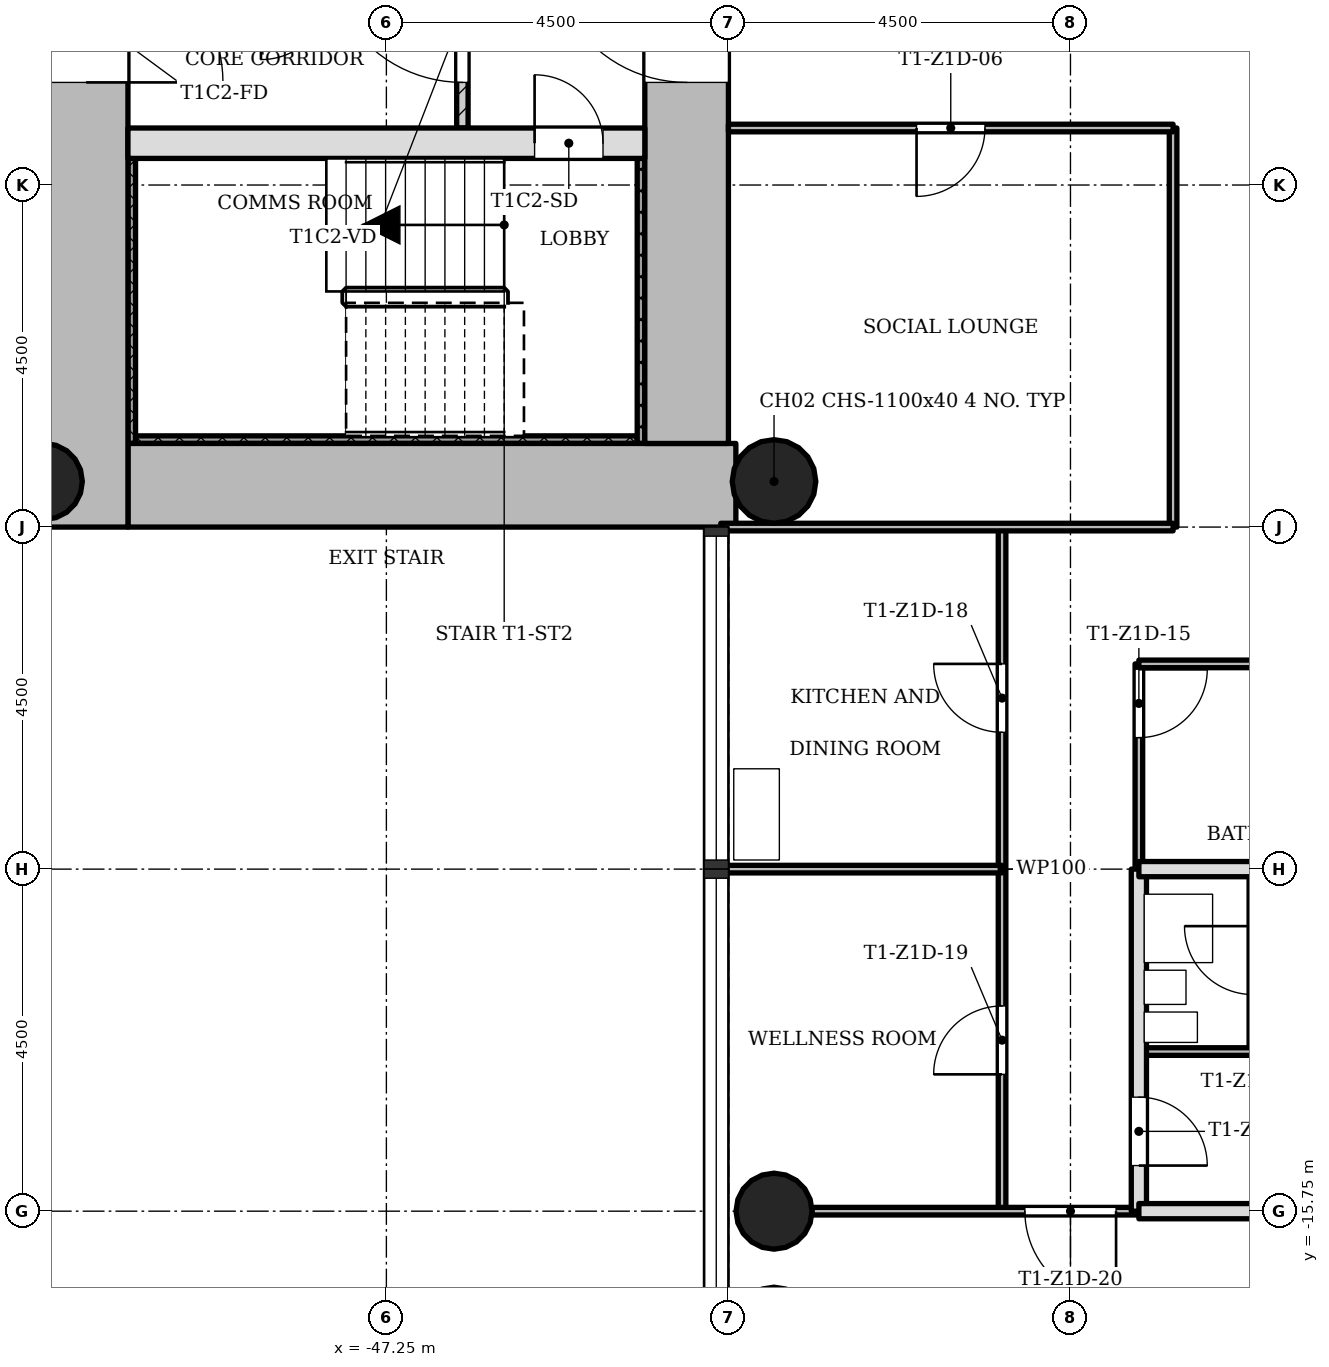
"""IFC4 building model, lengths in metres.
Left out: names, types, materials, properties, quantities, classifications, styles, units other than length and angle.
Written with IfcOpenShell. Run it as: python <this file> out.ifc"""

import sys

from ifc_helpers import new_model, si_unit, direction, frame, frame_2d, origin, origin_2d, place, context, subcontext, project, spatial, rectangle, hollow_circle, extrude, element, fill, save


model = new_model("IFC4")
c1 = context("Model", 3, precision=1e-05, world=origin(), true_north=direction((0.0, 1.0)))
c2 = subcontext(c1, "Body", "Model", "MODEL_VIEW")
j1 = project(units=[si_unit("LENGTHUNIT", "METRE"), si_unit("PLANEANGLEUNIT", "RADIAN")], contexts=[c1])
p1 = place(None, origin())
s1 = spatial("IfcSite", under=j1, at=p1, CompositionType="ELEMENT")
p2 = place(p1, origin())
s2 = spatial("IfcBuilding", under=s1, at=p2, CompositionType="ELEMENT")
p3 = place(p2, frame((0.0, 0.0, 61.9)))
s3 = spatial("IfcBuildingStorey", under=s2, at=p3, CompositionType="ELEMENT", Elevation=61.9)
p4 = place(p3, frame((-50.65, -6.2, 0.0), z_axis=(0.0, 0.0, 1.0), x_axis=(1.0, 0.0, 0.0)))
e1 = element("IfcWall", 1, at=p4, inside=s3, PredefinedType="SHEAR", context=c2, shape_type="SweptSolid", body=[
    extrude(rectangle(XDim=7.998, YDim=1.1, at=frame_2d((3.999, 0.0))), origin(), (0.0, 0.0, 1.0), 3.4),
])
p5 = place(p3, frame((-43.3, -5.65, 0.0), z_axis=(0.0, 0.0, 1.0), x_axis=(0.0, 1.0, 0.0)))
e2 = element("IfcWall", 2, at=p5, inside=s3, PredefinedType="SHEAR", context=c2, shape_type="SweptSolid", body=[
    extrude(rectangle(XDim=12.4, YDim=1.1, at=frame_2d((6.2, 0.0))), origin(), (0.0, 0.0, 1.0), 3.4),
])
p6 = place(p5, frame((4.75, 0.0, 0.0)))
e3 = element("IfcOpeningElement", 3, at=p6, cuts=e2, PredefinedType="OPENING", context=c2, shape_type="SweptSolid", body=[
    extrude(rectangle(XDim=1.8, YDim=2.1, at=frame_2d((0.9, 1.05))), frame((0.0, 0.56, 0.0), z_axis=(0.0, -1.0, 0.0), x_axis=(1.0, 0.0, 0.0)), (0.0, 0.0, 1.0), 1.12),
])
p7 = place(p3, frame((-51.2, 5.65, 0.0), z_axis=(0.0, 0.0, 1.0), x_axis=(0.0, -1.0, 0.0)))
e4 = element("IfcWall", 4, at=p7, inside=s3, PredefinedType="SHEAR", context=c2, shape_type="SweptSolid", body=[
    extrude(rectangle(XDim=12.4, YDim=1.1, at=frame_2d((6.2, 0.0))), origin(), (0.0, 0.0, 1.0), 3.4),
])
p8 = place(p7, frame((4.75, 0.0, 0.0)))
e5 = element("IfcOpeningElement", 5, at=p8, cuts=e4, PredefinedType="OPENING", context=c2, shape_type="SweptSolid", body=[
    extrude(rectangle(XDim=1.8, YDim=2.1, at=frame_2d((0.9, 1.05))), frame((0.0, 0.56, 0.0), z_axis=(0.0, -1.0, 0.0), x_axis=(1.0, 0.0, 0.0)), (0.0, 0.0, 1.0), 1.12),
])
p9 = place(p3, frame((-50.65, -1.7, 0.0), z_axis=(0.0, 0.0, 1.0), x_axis=(1.0, 0.0, 0.0)))
e6 = element("IfcWall", 6, at=p9, inside=s3, PredefinedType="SHEAR", context=c2, shape_type="SweptSolid", body=[
    extrude(rectangle(XDim=6.8, YDim=0.4, at=frame_2d((3.4, 0.0))), origin(), (0.0, 0.0, 1.0), 3.4),
])
p10 = place(p9, frame((5.35, 0.0, 0.0)))
e7 = element("IfcOpeningElement", 7, at=p10, cuts=e6, PredefinedType="OPENING", context=c2, shape_type="SweptSolid", body=[
    extrude(rectangle(XDim=0.9, YDim=2.1, at=frame_2d((0.45, 1.05))), frame((0.0, 0.21, 0.0), z_axis=(0.0, -1.0, 0.0), x_axis=(1.0, 0.0, 0.0)), (0.0, 0.0, 1.0), 0.42),
])
for number, where, z_axis, x_axis in (
    (8, (-51.75, -6.15, 0.0), (0.0, 0.0, 1.0), (1.0, 0.0, 0.0)),
    (9, (-42.15, -15.75, 0.0), (0.0, 0.0, 1.0), (1.0, 0.0, 0.0)),
):
    element("IfcColumn", number, at=place(p3, frame(where, z_axis=z_axis, x_axis=x_axis)), inside=s3, PredefinedType="COLUMN", context=c2, shape_type="SweptSolid", body=[
        extrude(hollow_circle(Radius=0.5, WallThickness=0.036, at=origin_2d()), origin(), (0.0, 0.0, 1.0), 3.4),
    ])
p11 = place(p3, frame((-42.15, -6.15, 0.0), z_axis=(0.0, 0.0, 1.0), x_axis=(1.0, 0.0, 0.0)))
e10 = element("IfcColumn", 10, at=p11, inside=s3, PredefinedType="COLUMN", context=c2, shape_type="SweptSolid", body=[
    extrude(hollow_circle(Radius=0.55, WallThickness=0.04, at=origin_2d()), origin(), (0.0, 0.0, 1.0), 3.4),
])
p12 = place(p3, frame((-46.25, 1.5, 0.0), z_axis=(0.0, 0.0, 1.0), x_axis=(0.0, -1.0, 0.0)))
e11 = element("IfcWall", 11, at=p12, inside=s3, PredefinedType="PARTITIONING", context=c2, shape_type="SweptSolid", body=[
    extrude(rectangle(XDim=3.0, YDim=0.15, at=frame_2d((1.5, 0.0))), origin(), (0.0, 0.0, 1.0), 3.0),
])
p13 = place(p12, frame((0.6, 0.0, 0.0)))
e12 = element("IfcOpeningElement", 12, at=p13, cuts=e11, PredefinedType="OPENING", context=c2, shape_type="SweptSolid", body=[
    extrude(rectangle(XDim=1.8, YDim=2.1, at=frame_2d((0.9, 1.05))), frame((0.0, 0.085, 0.0), z_axis=(0.0, -1.0, 0.0), x_axis=(1.0, 0.0, 0.0)), (0.0, 0.0, 1.0), 0.17),
])
p14 = place(p3, frame((-39.15, -15.75, 0.0), z_axis=(0.0, 0.0, 1.0), x_axis=(0.0, 1.0, 0.0)))
e13 = element("IfcWall", 13, at=p14, inside=s3, PredefinedType="PARTITIONING", context=c2, shape_type="SweptSolid", body=[
    extrude(rectangle(XDim=9.0, YDim=0.1, at=frame_2d((4.5, 0.0))), origin(), (0.0, 0.0, 1.0), 3.0),
])
p15 = place(p14, frame((6.3, 0.0, 0.0)))
e14 = element("IfcOpeningElement", 14, at=p15, cuts=e13, PredefinedType="OPENING", context=c2, shape_type="SweptSolid", body=[
    extrude(rectangle(XDim=0.9, YDim=2.1, at=frame_2d((0.45, 1.05))), frame((0.0, 0.06, 0.0), z_axis=(0.0, -1.0, 0.0), x_axis=(1.0, 0.0, 0.0)), (0.0, 0.0, 1.0), 0.12),
])
p16 = place(p14, frame((1.8, 0.0, 0.0)))
e15 = element("IfcOpeningElement", 15, at=p16, cuts=e13, PredefinedType="OPENING", context=c2, shape_type="SweptSolid", body=[
    extrude(rectangle(XDim=0.9, YDim=2.1, at=frame_2d((0.45, 1.05))), frame((0.0, 0.06, 0.0), z_axis=(0.0, -1.0, 0.0), x_axis=(1.0, 0.0, 0.0)), (0.0, 0.0, 1.0), 0.12),
])
p17 = place(p3, frame((-37.35, -11.25, 0.0), z_axis=(0.0, 0.0, 1.0), x_axis=(0.0, 1.0, 0.0)))
e16 = element("IfcWall", 16, at=p17, inside=s3, PredefinedType="PARTITIONING", context=c2, shape_type="SweptSolid", body=[
    extrude(rectangle(XDim=2.7, YDim=0.1, at=frame_2d((1.35, 0.0))), origin(), (0.0, 0.0, 1.0), 3.0),
])
p18 = place(p17, frame((1.73, 0.0, 0.0)))
e17 = element("IfcOpeningElement", 17, at=p18, cuts=e16, PredefinedType="OPENING", context=c2, shape_type="SweptSolid", body=[
    extrude(rectangle(XDim=0.9, YDim=2.1, at=frame_2d((0.45, 1.05))), frame((0.0, 0.06, 0.0), z_axis=(0.0, -1.0, 0.0), x_axis=(1.0, 0.0, 0.0)), (0.0, 0.0, 1.0), 0.12),
])
p19 = place(p3, frame((-37.35, -15.75, 0.0), z_axis=(0.0, 0.0, 1.0), x_axis=(0.0, 1.0, 0.0)))
e18 = element("IfcWall", 18, at=p19, inside=s3, PredefinedType="SOLIDWALL", context=c2, shape_type="SweptSolid", body=[
    extrude(rectangle(XDim=4.5, YDim=0.2, at=frame_2d((2.25, 0.0))), origin(), (0.0, 0.0, 1.0), 3.0),
])
p20 = place(p19, frame((0.6, 0.0, 0.0)))
e19 = element("IfcOpeningElement", 19, at=p20, cuts=e18, PredefinedType="OPENING", context=c2, shape_type="SweptSolid", body=[
    extrude(rectangle(XDim=0.9, YDim=2.1, at=frame_2d((0.45, 1.05))), frame((0.0, 0.11, 0.0), z_axis=(0.0, -1.0, 0.0), x_axis=(1.0, 0.0, 0.0)), (0.0, 0.0, 1.0), 0.22),
])
p21 = place(p3, frame((-36.9, -6.75, 0.0), z_axis=(0.0, 0.0, 1.0), x_axis=(0.0, 1.0, 0.0)))
e20 = element("IfcWall", 20, at=p21, inside=s3, PredefinedType="PARTITIONING", context=c2, shape_type="SweptSolid", body=[
    extrude(rectangle(XDim=5.25, YDim=0.1, at=frame_2d((2.625, 0.0))), origin(), (0.0, 0.0, 1.0), 3.0),
])
p22 = place(p3, frame((-35.85, -13.65, 0.0), z_axis=(0.0, 0.0, 1.0), x_axis=(0.0, 1.0, 0.0)))
e21 = element("IfcWall", 21, at=p22, inside=s3, PredefinedType="PARTITIONING", context=c2, shape_type="SweptSolid", body=[
    extrude(rectangle(XDim=2.4, YDim=0.1, at=frame_2d((1.2, 0.0))), origin(), (0.0, 0.0, 1.0), 3.0),
])
p23 = place(p22, frame((0.75, 0.0, 0.0)))
e22 = element("IfcOpeningElement", 22, at=p23, cuts=e21, PredefinedType="OPENING", context=c2, shape_type="SweptSolid", body=[
    extrude(rectangle(XDim=0.9, YDim=2.1, at=frame_2d((0.45, 1.05))), frame((0.0, 0.06, 0.0), z_axis=(0.0, -1.0, 0.0), x_axis=(1.0, 0.0, 0.0)), (0.0, 0.0, 1.0), 0.12),
])
p24 = place(p3, frame((-41.65, -15.75, 0.0), z_axis=(0.0, 0.0, 1.0), x_axis=(1.0, 0.0, 0.0)))
e23 = element("IfcWall", 23, at=p24, inside=s3, PredefinedType="PARTITIONING", context=c2, shape_type="SweptSolid", body=[
    extrude(rectangle(XDim=4.3, YDim=0.1, at=frame_2d((2.15, 0.0))), origin(), (0.0, 0.0, 1.0), 3.0),
])
p25 = place(p24, frame((2.8, 0.0, 0.0)))
e24 = element("IfcOpeningElement", 24, at=p25, cuts=e23, PredefinedType="OPENING", context=c2, shape_type="SweptSolid", body=[
    extrude(rectangle(XDim=1.2, YDim=2.1, at=frame_2d((0.6, 1.05))), frame((0.0, 0.06, 0.0), z_axis=(0.0, -1.0, 0.0), x_axis=(1.0, 0.0, 0.0)), (0.0, 0.0, 1.0), 0.12),
])
p26 = place(p3, frame((-37.35, -15.75, 0.0), z_axis=(0.0, 0.0, 1.0), x_axis=(1.0, 0.0, 0.0)))
e25 = element("IfcWall", 25, at=p26, inside=s3, PredefinedType="SOLIDWALL", context=c2, shape_type="SweptSolid", body=[
    extrude(rectangle(XDim=7.0, YDim=0.2, at=frame_2d((3.5, 0.0))), origin(), (0.0, 0.0, 1.0), 3.0),
])
p27 = place(p3, frame((-37.35, -13.65, 0.0), z_axis=(0.0, 0.0, 1.0), x_axis=(1.0, 0.0, 0.0)))
e26 = element("IfcWall", 26, at=p27, inside=s3, PredefinedType="PARTITIONING", context=c2, shape_type="SweptSolid", body=[
    extrude(rectangle(XDim=1.5, YDim=0.1, at=frame_2d((0.75, 0.0))), origin(), (0.0, 0.0, 1.0), 3.0),
])
p28 = place(p3, frame((-42.85, -11.25, 0.0), z_axis=(0.0, 0.0, 1.0), x_axis=(1.0, 0.0, 0.0)))
e27 = element("IfcWall", 27, at=p28, inside=s3, PredefinedType="PARTITIONING", context=c2, shape_type="SweptSolid", body=[
    extrude(rectangle(XDim=3.7, YDim=0.1, at=frame_2d((1.85, 0.0))), origin(), (0.0, 0.0, 1.0), 3.0),
])
p29 = place(p3, frame((-37.35, -11.25, 0.0), z_axis=(0.0, 0.0, 1.0), x_axis=(1.0, 0.0, 0.0)))
e28 = element("IfcWall", 28, at=p29, inside=s3, PredefinedType="SOLIDWALL", context=c2, shape_type="SweptSolid", body=[
    extrude(rectangle(XDim=8.2, YDim=0.2, at=frame_2d((4.1, 0.0))), origin(), (0.0, 0.0, 1.0), 3.0),
])
p30 = place(p3, frame((-37.35, -8.55, 0.0), z_axis=(0.0, 0.0, 1.0), x_axis=(1.0, 0.0, 0.0)))
e29 = element("IfcWall", 29, at=p30, inside=s3, PredefinedType="PARTITIONING", context=c2, shape_type="SweptSolid", body=[
    extrude(rectangle(XDim=2.25, YDim=0.1, at=frame_2d((1.125, 0.0))), origin(), (0.0, 0.0, 1.0), 3.0),
])
p31 = place(p3, frame((-42.85, -6.75, 0.0), z_axis=(0.0, 0.0, 1.0), x_axis=(1.0, 0.0, 0.0)))
e30 = element("IfcWall", 30, at=p31, inside=s3, PredefinedType="PARTITIONING", context=c2, shape_type="SweptSolid", body=[
    extrude(rectangle(XDim=5.95, YDim=0.1, at=frame_2d((2.975, 0.0))), origin(), (0.0, 0.0, 1.0), 3.0),
])
p32 = place(p3, frame((-42.75, -1.5, 0.0), z_axis=(0.0, 0.0, 1.0), x_axis=(1.0, 0.0, 0.0)))
e31 = element("IfcWall", 31, at=p32, inside=s3, PredefinedType="PARTITIONING", context=c2, shape_type="SweptSolid", body=[
    extrude(rectangle(XDim=5.85, YDim=0.1, at=frame_2d((2.925, 0.0))), origin(), (0.0, 0.0, 1.0), 3.0),
])
p33 = place(p32, frame((2.475, 0.0, 0.0)))
e32 = element("IfcOpeningElement", 32, at=p33, cuts=e31, PredefinedType="OPENING", context=c2, shape_type="SweptSolid", body=[
    extrude(rectangle(XDim=0.9, YDim=2.1, at=frame_2d((0.45, 1.05))), frame((0.0, 0.06, 0.0), z_axis=(0.0, -1.0, 0.0), x_axis=(1.0, 0.0, 0.0)), (0.0, 0.0, 1.0), 0.12),
])
p34 = place(p3, frame((-50.6, -1.9, 0.0), z_axis=(0.0, 0.0, 1.0), x_axis=(0.0, -1.0, 0.0)))
e33 = element("IfcWall", 33, at=p34, inside=s3, PredefinedType="SHEAR", context=c2, shape_type="SweptSolid", body=[
    extrude(rectangle(XDim=3.75, YDim=0.1, at=frame_2d((1.875, 0.0))), origin(), (0.0, 0.0, 1.0), 3.4),
])
p35 = place(p3, frame((-43.95, -5.6, 0.0), z_axis=(0.0, 0.0, 1.0), x_axis=(-1.0, 0.0, 0.0)))
e34 = element("IfcWall", 34, at=p35, inside=s3, PredefinedType="SHEAR", context=c2, shape_type="SweptSolid", body=[
    extrude(rectangle(XDim=6.6, YDim=0.1, at=frame_2d((3.3, 0.0))), origin(), (0.0, 0.0, 1.0), 3.4),
])
p36 = place(p3, frame((-43.9, -1.9, 0.0), z_axis=(0.0, 0.0, 1.0), x_axis=(0.0, -1.0, 0.0)))
e35 = element("IfcWall", 35, at=p36, inside=s3, PredefinedType="SHEAR", context=c2, shape_type="SweptSolid", body=[
    extrude(rectangle(XDim=3.75, YDim=0.1, at=frame_2d((1.875, 0.0))), origin(), (0.0, 0.0, 1.0), 3.4),
])
p37 = place(p13, origin())
e36 = element("IfcDoor", 36, at=p37, inside=s3, OperationType="SINGLE_SWING_LEFT", PredefinedType="DOOR", context=c2, shape_type="SweptSolid", body=[
    extrude(rectangle(XDim=1.8, YDim=2.1, at=frame_2d((0.9, 1.05))), frame((0.0, 0.025, 0.0), z_axis=(0.0, -1.0, 0.0), x_axis=(1.0, 0.0, 0.0)), (0.0, 0.0, 1.0), 0.05),
])
fill(e12, e36)
p38 = place(p33, origin())
e37 = element("IfcDoor", 37, at=p38, inside=s3, OperationType="SINGLE_SWING_LEFT", PredefinedType="DOOR", context=c2, shape_type="SweptSolid", body=[
    extrude(rectangle(XDim=0.9, YDim=2.1, at=frame_2d((0.45, 1.05))), frame((0.0, 0.025, 0.0), z_axis=(0.0, -1.0, 0.0), x_axis=(1.0, 0.0, 0.0)), (0.0, 0.0, 1.0), 0.05),
])
fill(e32, e37)
p39 = place(p18, origin())
e38 = element("IfcDoor", 38, at=p39, inside=s3, OperationType="SINGLE_SWING_RIGHT", PredefinedType="DOOR", context=c2, shape_type="SweptSolid", body=[
    extrude(rectangle(XDim=0.9, YDim=2.1, at=frame_2d((0.45, 1.05))), frame((0.0, 0.025, 0.0), z_axis=(0.0, -1.0, 0.0), x_axis=(1.0, 0.0, 0.0)), (0.0, 0.0, 1.0), 0.05),
])
fill(e17, e38)
p40 = place(p20, origin())
e39 = element("IfcDoor", 39, at=p40, inside=s3, OperationType="SINGLE_SWING_LEFT", PredefinedType="DOOR", context=c2, shape_type="SweptSolid", body=[
    extrude(rectangle(XDim=0.9, YDim=2.1, at=frame_2d((0.45, 1.05))), frame((0.0, 0.025, 0.0), z_axis=(0.0, -1.0, 0.0), x_axis=(1.0, 0.0, 0.0)), (0.0, 0.0, 1.0), 0.05),
])
fill(e19, e39)
p41 = place(p15, origin())
e40 = element("IfcDoor", 40, at=p41, inside=s3, OperationType="SINGLE_SWING_LEFT", PredefinedType="DOOR", context=c2, shape_type="SweptSolid", body=[
    extrude(rectangle(XDim=0.9, YDim=2.1, at=frame_2d((0.45, 1.05))), frame((0.0, 0.025, 0.0), z_axis=(0.0, -1.0, 0.0), x_axis=(1.0, 0.0, 0.0)), (0.0, 0.0, 1.0), 0.05),
])
fill(e14, e40)
p42 = place(p16, origin())
e41 = element("IfcDoor", 41, at=p42, inside=s3, OperationType="SINGLE_SWING_RIGHT", PredefinedType="DOOR", context=c2, shape_type="SweptSolid", body=[
    extrude(rectangle(XDim=0.9, YDim=2.1, at=frame_2d((0.45, 1.05))), frame((0.0, 0.025, 0.0), z_axis=(0.0, -1.0, 0.0), x_axis=(1.0, 0.0, 0.0)), (0.0, 0.0, 1.0), 0.05),
])
fill(e15, e41)
p43 = place(p25, origin())
e42 = element("IfcDoor", 42, at=p43, inside=s3, OperationType="SINGLE_SWING_RIGHT", PredefinedType="DOOR", context=c2, shape_type="SweptSolid", body=[
    extrude(rectangle(XDim=1.2, YDim=2.1, at=frame_2d((0.6, 1.05))), frame((0.0, 0.025, 0.0), z_axis=(0.0, -1.0, 0.0), x_axis=(1.0, 0.0, 0.0)), (0.0, 0.0, 1.0), 0.05),
])
fill(e24, e42)
p44 = place(p10, origin())
e43 = element("IfcDoor", 43, at=p44, inside=s3, OperationType="SINGLE_SWING_RIGHT", PredefinedType="DOOR", context=c2, shape_type="SweptSolid", body=[
    extrude(rectangle(XDim=0.9, YDim=2.1, at=frame_2d((0.45, 1.05))), frame((0.0, 0.025, 0.0), z_axis=(0.0, -1.0, 0.0), x_axis=(1.0, 0.0, 0.0)), (0.0, 0.0, 1.0), 0.05),
])
fill(e7, e43)
p45 = place(p6, origin())
e44 = element("IfcDoor", 44, at=p45, inside=s3, OperationType="SINGLE_SWING_LEFT", PredefinedType="DOOR", context=c2, shape_type="SweptSolid", body=[
    extrude(rectangle(XDim=1.8, YDim=2.1, at=frame_2d((0.9, 1.05))), frame((0.0, 0.025, 0.0), z_axis=(0.0, -1.0, 0.0), x_axis=(1.0, 0.0, 0.0)), (0.0, 0.0, 1.0), 0.05),
])
fill(e3, e44)
p46 = place(p8, origin())
e45 = element("IfcDoor", 45, at=p46, inside=s3, OperationType="SINGLE_SWING_LEFT", PredefinedType="DOOR", context=c2, shape_type="SweptSolid", body=[
    extrude(rectangle(XDim=1.8, YDim=2.1, at=frame_2d((0.9, 1.05))), frame((0.0, 0.025, 0.0), z_axis=(0.0, -1.0, 0.0), x_axis=(1.0, 0.0, 0.0)), (0.0, 0.0, 1.0), 0.05),
])
fill(e5, e45)
save(model, sys.argv[1])
